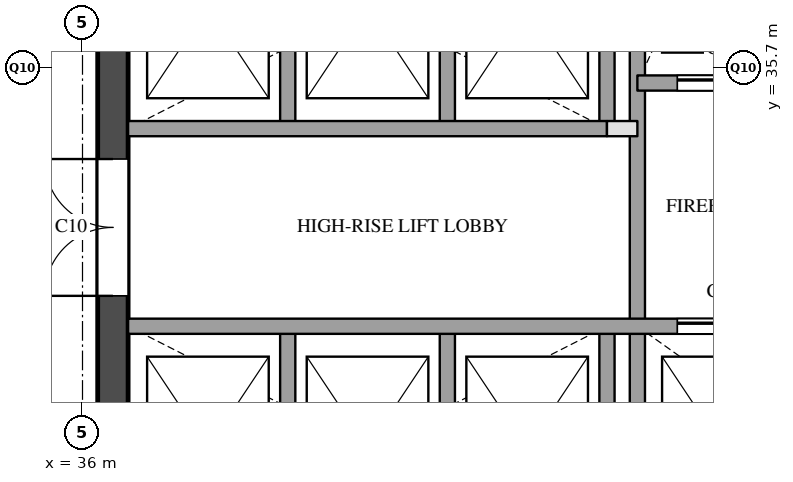
"""IFC4 building model, lengths in metres.
Left out: names, types, materials, properties, quantities, classifications, styles, units other than length and angle.
Written with IfcOpenShell. Run it as: python <this file> out.ifc"""

import sys

from ifc_helpers import new_model, si_unit, direction, frame, frame_2d, origin, place, context, subcontext, project, spatial, rectangle, extrude, element, fill, save


model = new_model("IFC4")
c1 = context("Model", 3, precision=1e-05, world=origin(), true_north=direction((0.0, 1.0)))
c2 = subcontext(c1, "Body", "Model", "MODEL_VIEW")
j1 = project(units=[si_unit("LENGTHUNIT", "METRE"), si_unit("PLANEANGLEUNIT", "RADIAN")], contexts=[c1])
p1 = place(None, origin())
s1 = spatial("IfcSite", under=j1, at=p1, CompositionType="ELEMENT")
p2 = place(p1, origin())
s2 = spatial("IfcBuilding", under=s1, at=p2, CompositionType="ELEMENT")
p3 = place(p2, frame((0.0, 0.0, 242.3)))
s3 = spatial("IfcBuildingStorey", under=s2, at=p3, CompositionType="ELEMENT", Elevation=242.3)
p4 = place(p3, frame((36.4, 29.1, 0.0), z_axis=(0.0, 0.0, 1.0), x_axis=(0.0, 1.0, 0.0)))
e1 = element("IfcWall", 1, at=p4, inside=s3, PredefinedType="SHEAR", context=c2, shape_type="SweptSolid", body=[
    extrude(rectangle(XDim=20.3, YDim=0.4, at=frame_2d((10.15, 0.0))), origin(), (0.0, 0.0, 1.0), 3.6),
])
p5 = place(p4, frame((3.6, 0.0, 0.0)))
e2 = element("IfcOpeningElement", 2, at=p5, cuts=e1, PredefinedType="OPENING", context=c2, shape_type="SweptSolid", body=[
    extrude(rectangle(XDim=1.8, YDim=2.1, at=frame_2d((0.9, 1.05))), frame((0.0, 0.21, 0.0), z_axis=(0.0, -1.0, 0.0), x_axis=(1.0, 0.0, 0.0)), (0.0, 0.0, 1.0), 0.42),
])
p6 = place(p4, frame((16.4, 0.0, 0.0)))
e3 = element("IfcOpeningElement", 3, at=p6, cuts=e1, PredefinedType="OPENING", context=c2, shape_type="SweptSolid", body=[
    extrude(rectangle(XDim=1.0, YDim=2.1, at=frame_2d((0.5, 1.05))), frame((0.0, 0.21, 0.0), z_axis=(0.0, -1.0, 0.0), x_axis=(1.0, 0.0, 0.0)), (0.0, 0.0, 1.0), 0.42),
])
p7 = place(p3, frame((38.7, 29.1, 0.0), z_axis=(0.0, 0.0, 1.0), x_axis=(0.0, 1.0, 0.0)))
e4 = element("IfcWall", 4, at=p7, inside=s3, PredefinedType="SOLIDWALL", context=c2, shape_type="SweptSolid", body=[
    extrude(rectangle(XDim=3.2, YDim=0.2, at=frame_2d((1.6, 0.0))), origin(), (0.0, 0.0, 1.0), 3.6),
])
p8 = place(p3, frame((38.7, 34.9, 0.0), z_axis=(0.0, 0.0, 1.0), x_axis=(0.0, 1.0, 0.0)))
e5 = element("IfcWall", 5, at=p8, inside=s3, PredefinedType="SOLIDWALL", context=c2, shape_type="SweptSolid", body=[
    extrude(rectangle(XDim=3.2, YDim=0.2, at=frame_2d((1.6, 0.0))), origin(), (0.0, 0.0, 1.0), 3.6),
])
p9 = place(p3, frame((40.8, 29.1, 0.0), z_axis=(0.0, 0.0, 1.0), x_axis=(0.0, 1.0, 0.0)))
e6 = element("IfcWall", 6, at=p9, inside=s3, PredefinedType="SOLIDWALL", context=c2, shape_type="SweptSolid", body=[
    extrude(rectangle(XDim=3.2, YDim=0.2, at=frame_2d((1.6, 0.0))), origin(), (0.0, 0.0, 1.0), 3.6),
])
p10 = place(p3, frame((40.8, 34.9, 0.0), z_axis=(0.0, 0.0, 1.0), x_axis=(0.0, 1.0, 0.0)))
e7 = element("IfcWall", 7, at=p10, inside=s3, PredefinedType="SOLIDWALL", context=c2, shape_type="SweptSolid", body=[
    extrude(rectangle(XDim=3.2, YDim=0.2, at=frame_2d((1.6, 0.0))), origin(), (0.0, 0.0, 1.0), 3.6),
])
p11 = place(p3, frame((42.9, 29.1, 0.0), z_axis=(0.0, 0.0, 1.0), x_axis=(0.0, 1.0, 0.0)))
e8 = element("IfcWall", 8, at=p11, inside=s3, PredefinedType="SOLIDWALL", context=c2, shape_type="SweptSolid", body=[
    extrude(rectangle(XDim=3.2, YDim=0.2, at=frame_2d((1.6, 0.0))), origin(), (0.0, 0.0, 1.0), 3.6),
])
p12 = place(p3, frame((42.9, 34.9, 0.0), z_axis=(0.0, 0.0, 1.0), x_axis=(0.0, 1.0, 0.0)))
e9 = element("IfcWall", 9, at=p12, inside=s3, PredefinedType="SOLIDWALL", context=c2, shape_type="SweptSolid", body=[
    extrude(rectangle(XDim=3.2, YDim=0.2, at=frame_2d((1.6, 0.0))), origin(), (0.0, 0.0, 1.0), 3.6),
])
p13 = place(p3, frame((43.3, 29.1, 0.0), z_axis=(0.0, 0.0, 1.0), x_axis=(0.0, 1.0, 0.0)))
e10 = element("IfcWall", 10, at=p13, inside=s3, PredefinedType="SOLIDWALL", context=c2, shape_type="SweptSolid", body=[
    extrude(rectangle(XDim=9.9, YDim=0.2, at=frame_2d((4.95, 0.0))), origin(), (0.0, 0.0, 1.0), 3.6),
])
p14 = place(p3, frame((36.6, 32.3, 0.0), z_axis=(0.0, 0.0, 1.0), x_axis=(1.0, 0.0, 0.0)))
e11 = element("IfcWall", 11, at=p14, inside=s3, PredefinedType="SOLIDWALL", context=c2, shape_type="SweptSolid", body=[
    extrude(rectangle(XDim=11.2, YDim=0.2, at=frame_2d((5.6, 0.0))), origin(), (0.0, 0.0, 1.0), 3.6),
])
p15 = place(p14, frame((7.225, 0.0, 0.0)))
e12 = element("IfcOpeningElement", 12, at=p15, cuts=e11, PredefinedType="OPENING", context=c2, shape_type="SweptSolid", body=[
    extrude(rectangle(XDim=1.2, YDim=2.1, at=frame_2d((0.6, 1.05))), frame((0.0, 0.11, 0.0), z_axis=(0.0, -1.0, 0.0), x_axis=(1.0, 0.0, 0.0)), (0.0, 0.0, 1.0), 0.22),
])
p16 = place(p14, frame((9.475, 0.0, 0.0)))
e13 = element("IfcOpeningElement", 13, at=p16, cuts=e11, PredefinedType="OPENING", context=c2, shape_type="SweptSolid", body=[
    extrude(rectangle(XDim=1.2, YDim=2.1, at=frame_2d((0.6, 1.05))), frame((0.0, 0.11, 0.0), z_axis=(0.0, -1.0, 0.0), x_axis=(1.0, 0.0, 0.0)), (0.0, 0.0, 1.0), 0.22),
])
p17 = place(p3, frame((42.9, 34.9, 0.0), z_axis=(0.0, 0.0, 1.0), x_axis=(1.0, 0.0, 0.0)))
e14 = element("IfcWall", 14, at=p17, inside=s3, PredefinedType="PARTITIONING", context=c2, shape_type="SweptSolid", body=[
    extrude(rectangle(XDim=0.4, YDim=0.2, at=frame_2d((0.2, 0.0))), origin(), (0.0, 0.0, 1.0), 3.6),
])
p18 = place(p3, frame((36.6, 34.9, 0.0), z_axis=(0.0, 0.0, 1.0), x_axis=(1.0, 0.0, 0.0)))
e15 = element("IfcWall", 15, at=p18, inside=s3, PredefinedType="SOLIDWALL", context=c2, shape_type="SweptSolid", body=[
    extrude(rectangle(XDim=6.3, YDim=0.2, at=frame_2d((3.15, 0.0))), origin(), (0.0, 0.0, 1.0), 3.6),
])
p19 = place(p3, frame((43.3, 35.5, 0.0), z_axis=(0.0, 0.0, 1.0), x_axis=(1.0, 0.0, 0.0)))
e16 = element("IfcWall", 16, at=p19, inside=s3, PredefinedType="SOLIDWALL", context=c2, shape_type="SweptSolid", body=[
    extrude(rectangle(XDim=4.5, YDim=0.2, at=frame_2d((2.25, 0.0))), origin(), (0.0, 0.0, 1.0), 3.6),
])
p20 = place(p19, frame((0.525, 0.0, 0.0)))
e17 = element("IfcOpeningElement", 17, at=p20, cuts=e16, PredefinedType="OPENING", context=c2, shape_type="SweptSolid", body=[
    extrude(rectangle(XDim=1.2, YDim=2.1, at=frame_2d((0.6, 1.05))), frame((0.0, 0.11, 0.0), z_axis=(0.0, -1.0, 0.0), x_axis=(1.0, 0.0, 0.0)), (0.0, 0.0, 1.0), 0.22),
])
p21 = place(p19, frame((3.025, 0.0, 0.0)))
e18 = element("IfcOpeningElement", 18, at=p21, cuts=e16, PredefinedType="OPENING", context=c2, shape_type="SweptSolid", body=[
    extrude(rectangle(XDim=0.7, YDim=2.1, at=frame_2d((0.35, 1.05))), frame((0.0, 0.11, 0.0), z_axis=(0.0, -1.0, 0.0), x_axis=(1.0, 0.0, 0.0)), (0.0, 0.0, 1.0), 0.22),
])
p22 = place(p15, origin())
e19 = element("IfcDoor", 19, at=p22, inside=s3, OperationType="SLIDING_TO_LEFT", PredefinedType="DOOR", context=c2, shape_type="SweptSolid", body=[
    extrude(rectangle(XDim=1.2, YDim=2.1, at=frame_2d((0.6, 1.05))), frame((0.0, 0.025, 0.0), z_axis=(0.0, -1.0, 0.0), x_axis=(1.0, 0.0, 0.0)), (0.0, 0.0, 1.0), 0.05),
])
fill(e12, e19)
p23 = place(p20, origin())
e20 = element("IfcDoor", 20, at=p23, inside=s3, OperationType="SLIDING_TO_LEFT", PredefinedType="DOOR", context=c2, shape_type="SweptSolid", body=[
    extrude(rectangle(XDim=1.2, YDim=2.1, at=frame_2d((0.6, 1.05))), frame((0.0, 0.025, 0.0), z_axis=(0.0, -1.0, 0.0), x_axis=(1.0, 0.0, 0.0)), (0.0, 0.0, 1.0), 0.05),
])
fill(e17, e20)
p24 = place(p5, origin())
e21 = element("IfcDoor", 21, at=p24, inside=s3, OperationType="DOUBLE_DOOR_SINGLE_SWING", PredefinedType="DOOR", context=c2, shape_type="SweptSolid", body=[
    extrude(rectangle(XDim=1.8, YDim=2.1, at=frame_2d((0.9, 1.05))), frame((0.0, 0.025, 0.0), z_axis=(0.0, -1.0, 0.0), x_axis=(1.0, 0.0, 0.0)), (0.0, 0.0, 1.0), 0.05),
])
fill(e2, e21)
save(model, sys.argv[1])
